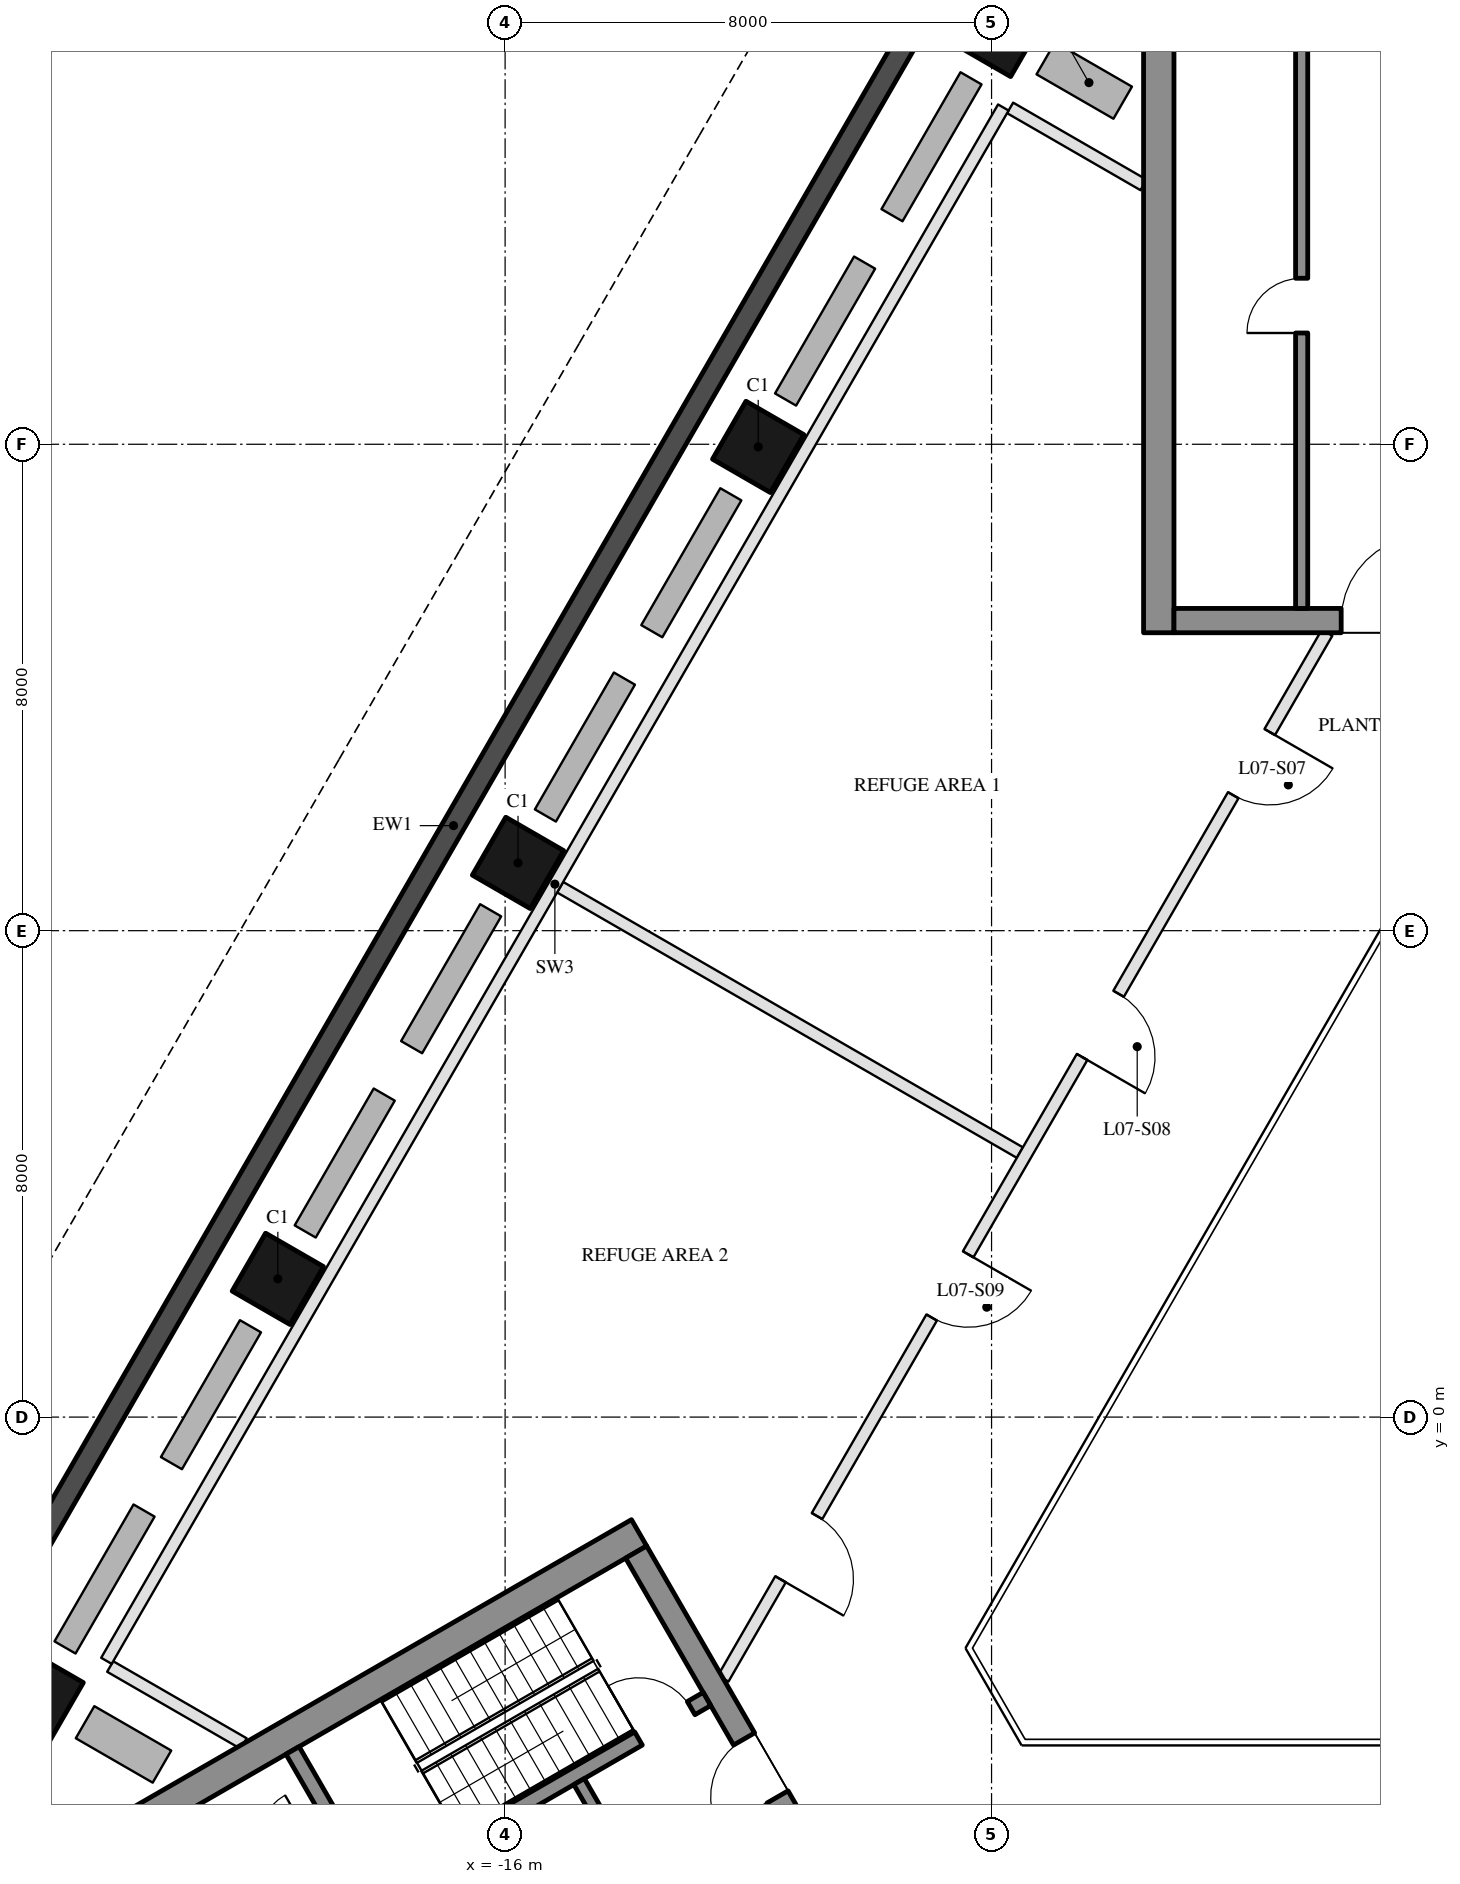
"""IFC4 building model, lengths in metres.
Left out: names, types, materials, properties, quantities, classifications, styles, units other than length and angle.
Written with IfcOpenShell. Run it as: python <this file> out.ifc"""

import sys

from ifc_helpers import new_model, si_unit, direction, frame, frame_2d, origin, origin_2d, place, context, subcontext, project, spatial, rectangle, hollow_rectangle, extrude, element, fill, save


model = new_model("IFC4")
c1 = context("Model", 3, precision=1e-05, world=origin(), true_north=direction((0.0, 1.0)))
c2 = subcontext(c1, "Body", "Model", "MODEL_VIEW")
j1 = project(units=[si_unit("LENGTHUNIT", "METRE"), si_unit("PLANEANGLEUNIT", "RADIAN")], contexts=[c1])
p1 = place(None, origin())
s1 = spatial("IfcSite", under=j1, at=p1, CompositionType="ELEMENT")
p2 = place(p1, origin())
s2 = spatial("IfcBuilding", under=s1, at=p2, CompositionType="ELEMENT")
p3 = place(p2, frame((0.0, 0.0, 42.0)))
s3 = spatial("IfcBuildingStorey", under=s2, at=p3, CompositionType="ELEMENT", Elevation=42.0)
for number, where, z_axis, x_axis in (
    (1, (-7.888, 22.798, 0.0), (0.0, 0.0, 1.0), (0.5, 0.866, 0.0)),
    (2, (-11.838, 15.957, 0.0), (0.0, 0.0, 1.0), (0.5, 0.866, 0.0)),
    (3, (-15.788, 9.115, 0.0), (0.0, 0.0, 1.0), (0.5, 0.866, 0.0)),
    (4, (-19.738, 2.273, 0.0), (0.0, 0.0, 1.0), (0.5, 0.866, 0.0)),
    (5, (-23.688, -4.568, 0.0), (0.0, 0.0, 1.0), (0.5, 0.866, 0.0)),
):
    element("IfcColumn", number, at=place(p3, frame(where, z_axis=z_axis, x_axis=x_axis)), inside=s3, PredefinedType="COLUMN", context=c2, shape_type="SweptSolid", body=[
        extrude(hollow_rectangle(XDim=1.1, YDim=1.1, WallThickness=0.05, at=origin_2d()), origin(), (0.0, 0.0, 1.0), 4.5),
    ])
p4 = place(p3, frame((-7.441, 26.022, 0.0), z_axis=(0.0, 0.0, 1.0), x_axis=(-0.499998380999, -0.866026338513, 0.0)))
e6 = element("IfcWall", 6, at=p4, inside=s3, PredefinedType="SOLIDWALL", context=c2, shape_type="SweptSolid", body=[
    extrude(rectangle(XDim=37.631, YDim=0.35, at=frame_2d((18.816, 0.0))), origin(), (0.0, 0.0, 1.0), 4.35),
])
p5 = place(p3, frame((-5.25, 12.9, 0.0), z_axis=(0.0, 0.0, 1.0), x_axis=(0.0, 1.0, 0.0)))
e7 = element("IfcWall", 7, at=p5, inside=s3, PredefinedType="SHEAR", context=c2, shape_type="SweptSolid", body=[
    extrude(rectangle(XDim=14.837, YDim=0.5, at=frame_2d((7.418, 0.0))), origin(), (0.0, 0.0, 1.0), 4.3),
])
p6 = place(p3, frame((5.0, 13.1, 0.0), z_axis=(0.0, 0.0, 1.0), x_axis=(-1.0, 0.0, 0.0)))
e8 = element("IfcWall", 8, at=p6, inside=s3, PredefinedType="SHEAR", context=c2, shape_type="SweptSolid", body=[
    extrude(rectangle(XDim=10.0, YDim=0.4, at=frame_2d((5.0, 0.0))), origin(), (0.0, 0.0, 1.0), 4.3),
])
p7 = place(p6, frame((3.55, 0.0, 0.0)))
e9 = element("IfcOpeningElement", 9, at=p7, cuts=e8, PredefinedType="OPENING", context=c2, shape_type="SweptSolid", body=[
    extrude(rectangle(XDim=1.1, YDim=2.1, at=frame_2d((0.55, 1.05))), frame((0.0, 0.21, 0.0), z_axis=(0.0, -1.0, 0.0), x_axis=(1.0, 0.0, 0.0)), (0.0, 0.0, 1.0), 0.42),
])
p8 = place(p6, frame((5.85, 0.0, 0.0)))
e10 = element("IfcOpeningElement", 10, at=p8, cuts=e8, PredefinedType="OPENING", context=c2, shape_type="SweptSolid", body=[
    extrude(rectangle(XDim=1.4, YDim=2.1, at=frame_2d((0.7, 1.05))), frame((0.0, 0.21, 0.0), z_axis=(0.0, -1.0, 0.0), x_axis=(1.0, 0.0, 0.0)), (0.0, 0.0, 1.0), 0.42),
])
p9 = place(p3, frame((-2.9, 13.3, 0.0), z_axis=(0.0, 0.0, 1.0), x_axis=(0.0, 1.0, 0.0)))
e11 = element("IfcWall", 11, at=p9, inside=s3, PredefinedType="SHEAR", context=c2, shape_type="SweptSolid", body=[
    extrude(rectangle(XDim=12.6, YDim=0.2, at=frame_2d((6.3, 0.0))), origin(), (0.0, 0.0, 1.0), 4.3),
])
p10 = place(p9, frame((4.53, 0.0, 0.0)))
e12 = element("IfcOpeningElement", 12, at=p10, cuts=e11, PredefinedType="OPENING", context=c2, shape_type="SweptSolid", body=[
    extrude(rectangle(XDim=0.9, YDim=2.1, at=frame_2d((0.45, 1.05))), frame((0.0, 0.11, 0.0), z_axis=(0.0, -1.0, 0.0), x_axis=(1.0, 0.0, 0.0)), (0.0, 0.0, 1.0), 0.22),
])
p11 = place(p9, frame((10.51, 0.0, 0.0)))
e13 = element("IfcOpeningElement", 13, at=p11, cuts=e11, PredefinedType="OPENING", context=c2, shape_type="SweptSolid", body=[
    extrude(rectangle(XDim=0.9, YDim=2.1, at=frame_2d((0.45, 1.05))), frame((0.0, 0.11, 0.0), z_axis=(0.0, -1.0, 0.0), x_axis=(1.0, 0.0, 0.0)), (0.0, 0.0, 1.0), 0.22),
])
p12 = place(p3, frame((-13.797, -1.903, 0.0), z_axis=(0.0, 0.0, 1.0), x_axis=(-0.866025009528, -0.500000682871, 0.0)))
e14 = element("IfcWall", 14, at=p12, inside=s3, PredefinedType="SHEAR", context=c2, shape_type="SweptSolid", body=[
    extrude(rectangle(XDim=14.837, YDim=0.5, at=frame_2d((7.418, 0.0))), origin(), (0.0, 0.0, 1.0), 4.3),
])
p13 = place(p3, frame((-13.845, -2.22, 0.0), z_axis=(0.0, 0.0, 1.0), x_axis=(0.500004234368, -0.866022959057, 0.0)))
e15 = element("IfcWall", 15, at=p13, inside=s3, PredefinedType="SHEAR", context=c2, shape_type="SweptSolid", body=[
    extrude(rectangle(XDim=10.0, YDim=0.4, at=frame_2d((5.0, 0.0))), origin(), (0.0, 0.0, 1.0), 4.3),
])
p14 = place(p13, frame((3.55, 0.0, 0.0)))
e16 = element("IfcOpeningElement", 16, at=p14, cuts=e15, PredefinedType="OPENING", context=c2, shape_type="SweptSolid", body=[
    extrude(rectangle(XDim=1.1, YDim=2.1, at=frame_2d((0.55, 1.05))), frame((0.0, 0.21, 0.0), z_axis=(0.0, -1.0, 0.0), x_axis=(1.0, 0.0, 0.0)), (0.0, 0.0, 1.0), 0.42),
])
p15 = place(p13, frame((5.85, 0.0, 0.0)))
e17 = element("IfcOpeningElement", 17, at=p15, cuts=e15, PredefinedType="OPENING", context=c2, shape_type="SweptSolid", body=[
    extrude(rectangle(XDim=1.4, YDim=2.1, at=frame_2d((0.7, 1.05))), frame((0.0, 0.21, 0.0), z_axis=(0.0, -1.0, 0.0), x_axis=(1.0, 0.0, 0.0)), (0.0, 0.0, 1.0), 0.42),
])
p16 = place(p3, frame((-12.681, -4.636, 0.0), z_axis=(0.0, 0.0, 1.0), x_axis=(-0.866021702275, -0.500006411147, 0.0)))
e18 = element("IfcWall", 18, at=p16, inside=s3, PredefinedType="SHEAR", context=c2, shape_type="SweptSolid", body=[
    extrude(rectangle(XDim=6.45, YDim=0.25, at=frame_2d((3.225, 0.0))), origin(), (0.0, 0.0, 1.0), 4.3),
])
p17 = place(p16, frame((0.3, 0.0, 0.0)))
e19 = element("IfcOpeningElement", 19, at=p17, cuts=e18, PredefinedType="OPENING", context=c2, shape_type="SweptSolid", body=[
    extrude(rectangle(XDim=1.0, YDim=2.1, at=frame_2d((0.5, 1.05))), frame((0.0, 0.135, 0.0), z_axis=(0.0, -1.0, 0.0), x_axis=(1.0, 0.0, 0.0)), (0.0, 0.0, 1.0), 0.27),
])
p18 = place(p3, frame((-19.496, -5.482, 0.0), z_axis=(0.0, 0.0, 1.0), x_axis=(0.499990435942, -0.866030925526, 0.0)))
e20 = element("IfcWall", 20, at=p18, inside=s3, PredefinedType="SHEAR", context=c2, shape_type="SweptSolid", body=[
    extrude(rectangle(XDim=2.55, YDim=0.25, at=frame_2d((1.275, 0.0))), origin(), (0.0, 0.0, 1.0), 4.3),
])
p19 = place(p3, frame((-14.783, -5.995, 0.0), z_axis=(0.0, 0.0, 1.0), x_axis=(0.49994636267, -0.866056369097, 0.0)))
e21 = element("IfcWall", 21, at=p19, inside=s3, PredefinedType="SHEAR", context=c2, shape_type="SweptSolid", body=[
    extrude(rectangle(XDim=2.8, YDim=0.2, at=frame_2d((1.4, 0.0))), origin(), (0.0, 0.0, 1.0), 4.3),
])
p20 = place(p19, frame((0.7, 0.0, 0.0)))
e22 = element("IfcOpeningElement", 22, at=p20, cuts=e21, PredefinedType="OPENING", context=c2, shape_type="SweptSolid", body=[
    extrude(rectangle(XDim=1.2, YDim=2.1, at=frame_2d((0.6, 1.05))), frame((0.0, 0.11, 0.0), z_axis=(0.0, -1.0, 0.0), x_axis=(1.0, 0.0, 0.0)), (0.0, 0.0, 1.0), 0.22),
])
p21 = place(p3, frame((-21.076, -6.395, 0.0), z_axis=(0.0, 0.0, 1.0), x_axis=(0.50001468107, -0.866016927499, 0.0)))
e23 = element("IfcWall", 23, at=p21, inside=s3, PredefinedType="PARTITIONING", context=c2, shape_type="SweptSolid", body=[
    extrude(rectangle(XDim=5.4, YDim=0.2, at=frame_2d((2.7, 0.0))), origin(), (0.0, 0.0, 1.0), 4.3),
])
p22 = place(p21, frame((1.913, 0.0, 0.0)))
e24 = element("IfcOpeningElement", 24, at=p22, cuts=e23, PredefinedType="OPENING", context=c2, shape_type="SweptSolid", body=[
    extrude(rectangle(XDim=0.9, YDim=2.1, at=frame_2d((0.45, 1.05))), frame((0.0, 0.11, 0.0), z_axis=(0.0, -1.0, 0.0), x_axis=(1.0, 0.0, 0.0)), (0.0, 0.0, 1.0), 0.22),
])
p23 = place(p21, frame((3.788, 0.0, 0.0)))
e25 = element("IfcOpeningElement", 25, at=p23, cuts=e23, PredefinedType="OPENING", context=c2, shape_type="SweptSolid", body=[
    extrude(rectangle(XDim=0.9, YDim=2.1, at=frame_2d((0.45, 1.05))), frame((0.0, 0.11, 0.0), z_axis=(0.0, -1.0, 0.0), x_axis=(1.0, 0.0, 0.0)), (0.0, 0.0, 1.0), 0.22),
])
p24 = place(p3, frame((-7.695, 21.532, 0.0), z_axis=(0.0, 0.0, 1.0), x_axis=(0.865999496279, -0.500044870432, 0.0)))
e26 = element("IfcWall", 26, at=p24, inside=s3, PredefinedType="PARTITIONING", context=c2, shape_type="SweptSolid", body=[
    extrude(rectangle(XDim=2.534, YDim=0.2, at=frame_2d((1.267, 0.0))), origin(), (0.0, 0.0, 1.0), 4.35),
])
p25 = place(p3, frame((-15.095, 8.715, 0.0), z_axis=(0.0, 0.0, 1.0), x_axis=(0.866023051915, -0.500004073536, 0.0)))
e27 = element("IfcWall", 27, at=p25, inside=s3, PredefinedType="PARTITIONING", context=c2, shape_type="SweptSolid", body=[
    extrude(rectangle(XDim=8.73, YDim=0.2, at=frame_2d((4.365, 0.0))), origin(), (0.0, 0.0, 1.0), 3.8),
])
p26 = place(p3, frame((-22.495, -4.102, 0.0), z_axis=(0.0, 0.0, 1.0), x_axis=(0.866065287345, -0.499930913282, 0.0)))
e28 = element("IfcWall", 28, at=p26, inside=s3, PredefinedType="PARTITIONING", context=c2, shape_type="SweptSolid", body=[
    extrude(rectangle(XDim=2.534, YDim=0.2, at=frame_2d((1.267, 0.0))), origin(), (0.0, 0.0, 1.0), 4.35),
])
p27 = place(p3, frame((-7.806, 21.539, 0.0), z_axis=(0.0, 0.0, 1.0), x_axis=(-0.500002084189, -0.866024200474, 0.0)))
e29 = element("IfcWall", 29, at=p27, inside=s3, PredefinedType="PARTITIONING", context=c2, shape_type="SweptSolid", body=[
    extrude(rectangle(XDim=29.5, YDim=0.2, at=frame_2d((14.75, 0.0))), origin(), (0.0, 0.0, 1.0), 3.75),
])
p28 = place(p3, frame((-2.482, 12.9, 0.0), z_axis=(0.0, 0.0, 1.0), x_axis=(-0.50000478328, -0.866022642139, 0.0)))
e30 = element("IfcWall", 30, at=p28, inside=s3, PredefinedType="PARTITIONING", context=c2, shape_type="SweptSolid", body=[
    extrude(rectangle(XDim=19.861, YDim=0.2, at=frame_2d((9.931, 0.0))), origin(), (0.0, 0.0, 1.0), 3.75),
])
p29 = place(p28, frame((1.885, 0.0, 0.0)))
e31 = element("IfcOpeningElement", 31, at=p29, cuts=e30, PredefinedType="OPENING", context=c2, shape_type="SweptSolid", body=[
    extrude(rectangle(XDim=1.2, YDim=2.1, at=frame_2d((0.6, 1.05))), frame((0.0, 0.11, 0.0), z_axis=(0.0, -1.0, 0.0), x_axis=(1.0, 0.0, 0.0)), (0.0, 0.0, 1.0), 0.22),
])
p30 = place(p28, frame((6.857, 0.0, 0.0)))
e32 = element("IfcOpeningElement", 32, at=p30, cuts=e30, PredefinedType="OPENING", context=c2, shape_type="SweptSolid", body=[
    extrude(rectangle(XDim=1.2, YDim=2.1, at=frame_2d((0.6, 1.05))), frame((0.0, 0.11, 0.0), z_axis=(0.0, -1.0, 0.0), x_axis=(1.0, 0.0, 0.0)), (0.0, 0.0, 1.0), 0.22),
])
p31 = place(p28, frame((11.804, 0.0, 0.0)))
e33 = element("IfcOpeningElement", 33, at=p31, cuts=e30, PredefinedType="OPENING", context=c2, shape_type="SweptSolid", body=[
    extrude(rectangle(XDim=1.2, YDim=2.1, at=frame_2d((0.6, 1.05))), frame((0.0, 0.11, 0.0), z_axis=(0.0, -1.0, 0.0), x_axis=(1.0, 0.0, 0.0)), (0.0, 0.0, 1.0), 0.22),
])
p32 = place(p28, frame((16.776, 0.0, 0.0)))
e34 = element("IfcOpeningElement", 34, at=p32, cuts=e30, PredefinedType="OPENING", context=c2, shape_type="SweptSolid", body=[
    extrude(rectangle(XDim=1.2, YDim=2.1, at=frame_2d((0.6, 1.05))), frame((0.0, 0.11, 0.0), z_axis=(0.0, -1.0, 0.0), x_axis=(1.0, 0.0, 0.0)), (0.0, 0.0, 1.0), 0.22),
])
p33 = place(p10, origin())
e35 = element("IfcDoor", 35, at=p33, inside=s3, OperationType="SINGLE_SWING_LEFT", PredefinedType="DOOR", context=c2, shape_type="SweptSolid", body=[
    extrude(rectangle(XDim=0.9, YDim=2.1, at=frame_2d((0.45, 1.05))), frame((0.0, 0.025, 0.0), z_axis=(0.0, -1.0, 0.0), x_axis=(1.0, 0.0, 0.0)), (0.0, 0.0, 1.0), 0.05),
])
fill(e12, e35)
p34 = place(p8, frame((1.4, 0.0, 0.0), z_axis=(0.0, 0.0, 1.0), x_axis=(-1.0, 0.0, 0.0)))
e36 = element("IfcDoor", 36, at=p34, inside=s3, OperationType="DOUBLE_DOOR_SINGLE_SWING", PredefinedType="DOOR", context=c2, shape_type="SweptSolid", body=[
    extrude(rectangle(XDim=1.4, YDim=2.1, at=frame_2d((0.7, 1.05))), frame((0.0, 0.025, 0.0), z_axis=(0.0, -1.0, 0.0), x_axis=(1.0, 0.0, 0.0)), (0.0, 0.0, 1.0), 0.05),
])
fill(e10, e36)
p35 = place(p14, frame((1.1, 0.0, 0.0), z_axis=(0.0, 0.0, 1.0), x_axis=(-1.0, 0.0, 0.0)))
e37 = element("IfcDoor", 37, at=p35, inside=s3, OperationType="SINGLE_SWING_LEFT", PredefinedType="DOOR", context=c2, shape_type="SweptSolid", body=[
    extrude(rectangle(XDim=1.1, YDim=2.1, at=frame_2d((0.55, 1.05))), frame((0.0, 0.025, 0.0), z_axis=(0.0, -1.0, 0.0), x_axis=(1.0, 0.0, 0.0)), (0.0, 0.0, 1.0), 0.05),
])
fill(e16, e37)
p36 = place(p17, frame((1.0, 0.0, 0.0), z_axis=(0.0, 0.0, 1.0), x_axis=(-1.0, 0.0, 0.0)))
e38 = element("IfcDoor", 38, at=p36, inside=s3, OperationType="SINGLE_SWING_LEFT", PredefinedType="DOOR", context=c2, shape_type="SweptSolid", body=[
    extrude(rectangle(XDim=1.0, YDim=2.1, at=frame_2d((0.5, 1.05))), frame((0.0, 0.025, 0.0), z_axis=(0.0, -1.0, 0.0), x_axis=(1.0, 0.0, 0.0)), (0.0, 0.0, 1.0), 0.05),
])
fill(e19, e38)
p37 = place(p29, origin())
e39 = element("IfcDoor", 39, at=p37, inside=s3, OperationType="SINGLE_SWING_LEFT", PredefinedType="DOOR", context=c2, shape_type="SweptSolid", body=[
    extrude(rectangle(XDim=1.2, YDim=2.1, at=frame_2d((0.6, 1.05))), frame((0.0, 0.025, 0.0), z_axis=(0.0, -1.0, 0.0), x_axis=(1.0, 0.0, 0.0)), (0.0, 0.0, 1.0), 0.05),
])
fill(e31, e39)
p38 = place(p30, origin())
e40 = element("IfcDoor", 40, at=p38, inside=s3, OperationType="SINGLE_SWING_RIGHT", PredefinedType="DOOR", context=c2, shape_type="SweptSolid", body=[
    extrude(rectangle(XDim=1.2, YDim=2.1, at=frame_2d((0.6, 1.05))), frame((0.0, 0.025, 0.0), z_axis=(0.0, -1.0, 0.0), x_axis=(1.0, 0.0, 0.0)), (0.0, 0.0, 1.0), 0.05),
])
fill(e32, e40)
p39 = place(p31, origin())
e41 = element("IfcDoor", 41, at=p39, inside=s3, OperationType="SINGLE_SWING_LEFT", PredefinedType="DOOR", context=c2, shape_type="SweptSolid", body=[
    extrude(rectangle(XDim=1.2, YDim=2.1, at=frame_2d((0.6, 1.05))), frame((0.0, 0.025, 0.0), z_axis=(0.0, -1.0, 0.0), x_axis=(1.0, 0.0, 0.0)), (0.0, 0.0, 1.0), 0.05),
])
fill(e33, e41)
p40 = place(p32, origin())
e42 = element("IfcDoor", 42, at=p40, inside=s3, OperationType="SINGLE_SWING_RIGHT", PredefinedType="DOOR", context=c2, shape_type="SweptSolid", body=[
    extrude(rectangle(XDim=1.2, YDim=2.1, at=frame_2d((0.6, 1.05))), frame((0.0, 0.025, 0.0), z_axis=(0.0, -1.0, 0.0), x_axis=(1.0, 0.0, 0.0)), (0.0, 0.0, 1.0), 0.05),
])
fill(e34, e42)
save(model, sys.argv[1])
